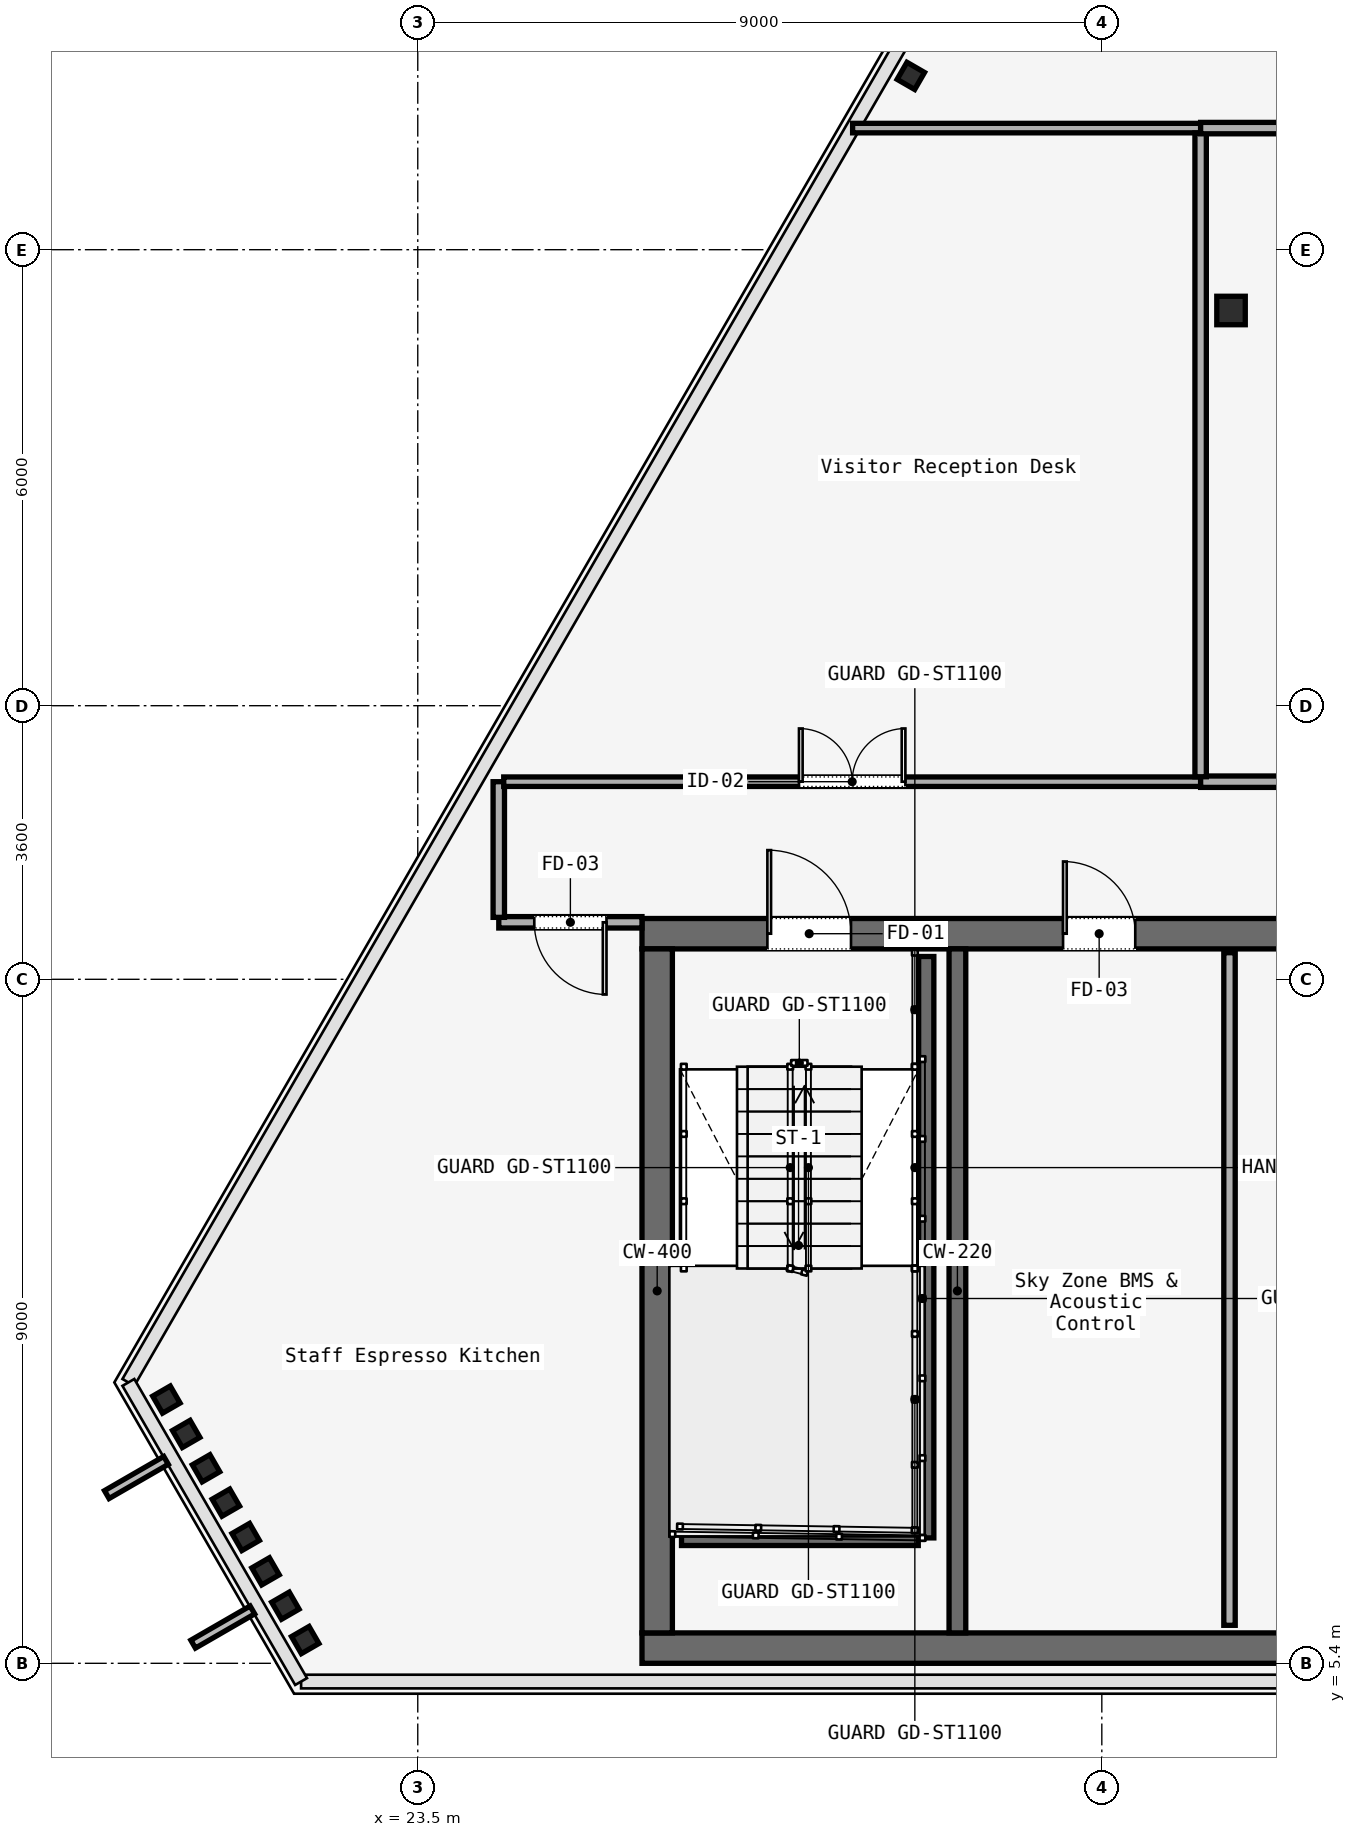
"""IFC4 building model, lengths in metres.
Left out: names, types, materials, properties, quantities, classifications, styles, units other than length and angle.
Written with IfcOpenShell. Run it as: python <this file> out.ifc"""

import sys

from ifc_helpers import new_model, si_unit, direction, frame, frame_2d, origin, origin_2d, place, context, subcontext, project, spatial, rectangle, i_section, extrude, element, fill, save


model = new_model("IFC4")
c1 = context("Model", 3, precision=1e-05, world=origin(), true_north=direction((0.0, 1.0)))
c2 = subcontext(c1, "Body", "Model", "MODEL_VIEW")
j1 = project(units=[si_unit("LENGTHUNIT", "METRE"), si_unit("PLANEANGLEUNIT", "RADIAN")], contexts=[c1])
p1 = place(None, origin())
s1 = spatial("IfcSite", under=j1, at=p1, CompositionType="ELEMENT")
p2 = place(p1, origin())
s2 = spatial("IfcBuilding", under=s1, at=p2, CompositionType="ELEMENT")
p3 = place(p2, frame((0.0, 0.0, 290.9)))
s3 = spatial("IfcBuildingStorey", under=s2, at=p3, CompositionType="ELEMENT", Elevation=290.9)
p4 = place(p3, frame((26.45, 15.0, 0.0), z_axis=(0.0, 0.0, 1.0), x_axis=(1.0, 0.0, 0.0)))
e1 = element("IfcWall", 1, at=p4, inside=s3, PredefinedType="SOLIDWALL", context=c2, shape_type="SweptSolid", body=[
    extrude(rectangle(XDim=31.1, YDim=0.4, at=frame_2d((15.55, 0.0))), origin(), (0.0, 0.0, 1.0), 3.58),
])
p5 = place(p4, frame((1.65, 0.0, 0.0)))
e2 = element("IfcOpeningElement", 2, at=p5, cuts=e1, PredefinedType="OPENING", context=c2, shape_type="SweptSolid", body=[
    extrude(rectangle(XDim=1.1, YDim=2.2, at=frame_2d((0.55, 1.1))), frame((0.0, 0.2, 0.0), z_axis=(0.0, -1.0, 0.0), x_axis=(1.0, 0.0, 0.0)), (0.0, 0.0, 1.0), 0.4),
])
p6 = place(p4, frame((13.65, 0.0, 0.0)))
e3 = element("IfcOpeningElement", 3, at=p6, cuts=e1, PredefinedType="OPENING", context=c2, shape_type="SweptSolid", body=[
    extrude(rectangle(XDim=1.1, YDim=2.2, at=frame_2d((0.55, 1.1))), frame((0.0, 0.2, 0.0), z_axis=(0.0, -1.0, 0.0), x_axis=(1.0, 0.0, 0.0)), (0.0, 0.0, 1.0), 0.4),
])
p7 = place(p4, frame((25.55, 0.0, 0.0)))
e4 = element("IfcOpeningElement", 4, at=p7, cuts=e1, PredefinedType="OPENING", context=c2, shape_type="SweptSolid", body=[
    extrude(rectangle(XDim=1.1, YDim=2.2, at=frame_2d((0.55, 1.1))), frame((0.0, 0.2, 0.0), z_axis=(0.0, -1.0, 0.0), x_axis=(1.0, 0.0, 0.0)), (0.0, 0.0, 1.0), 0.4),
])
p8 = place(p4, frame((19.35, 0.0, 0.0)))
e5 = element("IfcOpeningElement", 5, at=p8, cuts=e1, PredefinedType="OPENING", context=c2, shape_type="SweptSolid", body=[
    extrude(rectangle(XDim=1.1, YDim=2.2, at=frame_2d((0.55, 1.1))), frame((0.0, 0.2, 0.0), z_axis=(0.0, -1.0, 0.0), x_axis=(1.0, 0.0, 0.0)), (0.0, 0.0, 1.0), 0.4),
])
p9 = place(p4, frame((21.4, 0.0, 0.0)))
e6 = element("IfcOpeningElement", 6, at=p9, cuts=e1, PredefinedType="OPENING", context=c2, shape_type="SweptSolid", body=[
    extrude(rectangle(XDim=0.9, YDim=2.1, at=frame_2d((0.45, 1.05))), frame((0.0, 0.2, 0.0), z_axis=(0.0, -1.0, 0.0), x_axis=(1.0, 0.0, 0.0)), (0.0, 0.0, 1.0), 0.4),
])
p10 = place(p4, frame((5.54, 0.0, 0.0)))
e7 = element("IfcOpeningElement", 7, at=p10, cuts=e1, PredefinedType="OPENING", context=c2, shape_type="SweptSolid", body=[
    extrude(rectangle(XDim=0.95, YDim=2.2, at=frame_2d((0.475, 1.1))), frame((0.0, 0.2, 0.0), z_axis=(0.0, -1.0, 0.0), x_axis=(1.0, 0.0, 0.0)), (0.0, 0.0, 1.0), 0.4),
])
p11 = place(p4, frame((9.49, 0.0, 0.0)))
e8 = element("IfcOpeningElement", 8, at=p11, cuts=e1, PredefinedType="OPENING", context=c2, shape_type="SweptSolid", body=[
    extrude(rectangle(XDim=0.95, YDim=2.2, at=frame_2d((0.475, 1.1))), frame((0.0, 0.2, 0.0), z_axis=(0.0, -1.0, 0.0), x_axis=(1.0, 0.0, 0.0)), (0.0, 0.0, 1.0), 0.4),
])
p12 = place(p4, frame((23.35, 0.0, 0.0)))
e9 = element("IfcOpeningElement", 9, at=p12, cuts=e1, PredefinedType="OPENING", context=c2, shape_type="SweptSolid", body=[
    extrude(rectangle(XDim=1.3, YDim=2.3, at=frame_2d((0.65, 1.15))), frame((0.0, 0.2, 0.0), z_axis=(0.0, -1.0, 0.0), x_axis=(1.0, 0.0, 0.0)), (0.0, 0.0, 1.0), 0.4),
])
p13 = place(p3, frame((26.45, 5.6, 0.0), z_axis=(0.0, 0.0, 1.0), x_axis=(1.0, 0.0, 0.0)))
e10 = element("IfcWall", 10, at=p13, inside=s3, PredefinedType="SOLIDWALL", context=c2, shape_type="SweptSolid", body=[
    extrude(rectangle(XDim=31.1, YDim=0.4, at=frame_2d((15.55, 0.0))), origin(), (0.0, 0.0, 1.0), 3.58),
])
p14 = place(p3, frame((26.65, 5.8, 0.0), z_axis=(0.0, 0.0, 1.0), x_axis=(0.0, 1.0, 0.0)))
e11 = element("IfcWall", 11, at=p14, inside=s3, PredefinedType="SOLIDWALL", context=c2, shape_type="SweptSolid", body=[
    extrude(rectangle(XDim=9.0, YDim=0.4, at=frame_2d((4.5, 0.0))), origin(), (0.0, 0.0, 1.0), 3.58),
])
p15 = place(p3, frame((30.6, 5.8, 0.0), z_axis=(0.0, 0.0, 1.0), x_axis=(0.0, 1.0, 0.0)))
e12 = element("IfcWall", 12, at=p15, inside=s3, PredefinedType="SOLIDWALL", context=c2, shape_type="SweptSolid", body=[
    extrude(rectangle(XDim=9.0, YDim=0.22, at=frame_2d((4.5, 0.0))), origin(), (0.0, 0.0, 1.0), 3.58),
])
p16 = place(p3, frame((34.2, 23.2, 0.0), z_axis=(0.0, 0.0, 1.0), x_axis=(1.0, 0.0, 0.0)))
e13 = element("IfcColumn", 13, at=p16, inside=s3, PredefinedType="COLUMN", context=c2, shape_type="SweptSolid", body=[
    extrude(i_section(OverallWidth=0.375, OverallDepth=0.375, WebThickness=0.017, FlangeThickness=0.027, FilletRadius=0.015, at=origin_2d()), origin(), (0.0, 0.0, 1.0), 3.58),
])
p17 = place(p3, frame((29.987, 26.287, 0.0), z_axis=(0.064911794707, -0.112513777493, 0.991527664154), x_axis=(0.003987046067, 0.993644521472, 0.112492970506)))
e14 = element("IfcColumn", 14, at=p17, inside=s3, PredefinedType="COLUMN", context=c2, shape_type="SweptSolid", body=[
    extrude(i_section(OverallWidth=0.259, OverallDepth=0.267, WebThickness=0.013, FlangeThickness=0.021, FilletRadius=0.013, at=origin_2d()), origin(), (0.0, 0.0, 1.0), 3.611),
])
p18 = place(p3, frame((20.193, 8.87, 0.0), z_axis=(0.051724991926, -0.119406974825, 0.991497100134), x_axis=(-0.80011318397, 0.589167860222, 0.112694832712)))
e15 = element("IfcColumn", 15, at=p18, inside=s3, PredefinedType="COLUMN", context=c2, shape_type="SweptSolid", body=[
    extrude(i_section(OverallWidth=0.259, OverallDepth=0.267, WebThickness=0.013, FlangeThickness=0.021, FilletRadius=0.013, at=origin_2d()), origin(), (0.0, 0.0, 1.0), 3.611),
])
p19 = place(p3, frame((20.454, 8.418, 0.0), z_axis=(0.042555860906, -0.103746851986, 0.993692904979), x_axis=(-0.789181806641, 0.606433234677, 0.097112347031)))
e16 = element("IfcColumn", 16, at=p19, inside=s3, PredefinedType="COLUMN", context=c2, shape_type="SweptSolid", body=[
    extrude(i_section(OverallWidth=0.259, OverallDepth=0.267, WebThickness=0.013, FlangeThickness=0.021, FilletRadius=0.013, at=origin_2d()), origin(), (0.0, 0.0, 1.0), 3.603),
])
p20 = place(p3, frame((20.714, 7.966, 0.0), z_axis=(0.033470647913, -0.087919856081, 0.995565073029), x_axis=(-0.774036446069, 0.627877329686, 0.081471706891)))
e17 = element("IfcColumn", 17, at=p20, inside=s3, PredefinedType="COLUMN", context=c2, shape_type="SweptSolid", body=[
    extrude(i_section(OverallWidth=0.259, OverallDepth=0.267, WebThickness=0.013, FlangeThickness=0.021, FilletRadius=0.013, at=origin_2d()), origin(), (0.0, 0.0, 1.0), 3.596),
])
p21 = place(p3, frame((20.975, 7.514, 0.0), z_axis=(0.024274823165, -0.072076505755, 0.997103660749), x_axis=(-0.749462086186, 0.658762752498, 0.065865144737)))
e18 = element("IfcColumn", 18, at=p21, inside=s3, PredefinedType="COLUMN", context=c2, shape_type="SweptSolid", body=[
    extrude(i_section(OverallWidth=0.259, OverallDepth=0.267, WebThickness=0.013, FlangeThickness=0.021, FilletRadius=0.013, at=origin_2d()), origin(), (0.0, 0.0, 1.0), 3.591),
])
p22 = place(p3, frame((21.236, 7.062, 0.0), z_axis=(0.01504542395, -0.056165044156, 0.998308130305), x_axis=(-0.706681200924, 0.705737927659, 0.050355314766)))
e19 = element("IfcColumn", 19, at=p22, inside=s3, PredefinedType="COLUMN", context=c2, shape_type="SweptSolid", body=[
    extrude(i_section(OverallWidth=0.259, OverallDepth=0.267, WebThickness=0.013, FlangeThickness=0.021, FilletRadius=0.013, at=origin_2d()), origin(), (0.0, 0.0, 1.0), 3.586),
])
p23 = place(p3, frame((21.497, 6.61, 0.0), z_axis=(0.005791741097, -0.040133358895, 0.999177546404), x_axis=(-0.618468463563, 0.785024577009, 0.035116564052)))
e20 = element("IfcColumn", 20, at=p23, inside=s3, PredefinedType="COLUMN", context=c2, shape_type="SweptSolid", body=[
    extrude(i_section(OverallWidth=0.259, OverallDepth=0.267, WebThickness=0.013, FlangeThickness=0.021, FilletRadius=0.013, at=origin_2d()), origin(), (0.0, 0.0, 1.0), 3.583),
])
p24 = place(p3, frame((21.758, 6.158, 0.0), z_axis=(-0.003476876794, -0.024065441336, 0.999704339223), x_axis=(-0.371064507273, 0.928368302905, 0.021057673285)))
e21 = element("IfcColumn", 21, at=p24, inside=s3, PredefinedType="COLUMN", context=c2, shape_type="SweptSolid", body=[
    extrude(i_section(OverallWidth=0.259, OverallDepth=0.267, WebThickness=0.013, FlangeThickness=0.021, FilletRadius=0.013, at=origin_2d()), origin(), (0.0, 0.0, 1.0), 3.581),
])
p25 = place(p3, frame((22.019, 5.706, 0.0), z_axis=(-0.012750869074, -0.008046002945, 0.999886332127), x_axis=(0.46549137214, 0.884956095151, 0.013057263081)))
e22 = element("IfcColumn", 22, at=p25, inside=s3, PredefinedType="COLUMN", context=c2, shape_type="SweptSolid", body=[
    extrude(i_section(OverallWidth=0.259, OverallDepth=0.267, WebThickness=0.013, FlangeThickness=0.021, FilletRadius=0.013, at=origin_2d()), origin(), (0.0, 0.0, 1.0), 3.581),
])
p26 = place(p3, frame((30.19, 14.7, 0.0), z_axis=(0.0, 0.0, 1.0), x_axis=(0.0, -1.0, 0.0)))
e23 = element("IfcWall", 23, at=p26, inside=s3, PredefinedType="SOLIDWALL", context=c2, shape_type="SweptSolid", body=[
    extrude(rectangle(XDim=7.65, YDim=0.2, at=frame_2d((3.825, 0.0))), origin(), (0.0, 0.0, 1.0), 3.8),
])
p27 = place(p3, frame((26.97, 7.05, 0.0), z_axis=(0.0, 0.0, 1.0), x_axis=(1.0, 0.0, 0.0)))
e24 = element("IfcWall", 24, at=p27, inside=s3, PredefinedType="SOLIDWALL", context=c2, shape_type="SweptSolid", body=[
    extrude(rectangle(XDim=3.115, YDim=0.2, at=frame_2d((1.558, 0.0))), origin(), (0.0, 0.0, 1.0), 3.8),
])
p28 = place(p3, frame((34.18, 5.9, 0.0), z_axis=(0.0, 0.0, 1.0), x_axis=(0.0, 1.0, 0.0)))
e25 = element("IfcWall", 25, at=p28, inside=s3, PredefinedType="PARTITIONING", context=c2, shape_type="SweptSolid", body=[
    extrude(rectangle(XDim=8.85, YDim=0.15, at=frame_2d((4.425, 0.0))), origin(), (0.0, 0.0, 1.0), 3.01),
])
p29 = place(p3, frame((26.45, 15.15, 0.0), z_axis=(0.0, 0.0, 1.0), x_axis=(-1.0, 0.0, 0.0)))
e26 = element("IfcWall", 26, at=p29, inside=s3, PredefinedType="PARTITIONING", context=c2, shape_type="SweptSolid", body=[
    extrude(rectangle(XDim=1.884, YDim=0.15, at=frame_2d((0.942, 0.0))), origin(), (0.0, 0.0, 1.0), 3.01),
])
p30 = place(p29, frame((0.467, 0.0, 0.0)))
e27 = element("IfcOpeningElement", 27, at=p30, cuts=e26, PredefinedType="OPENING", context=c2, shape_type="SweptSolid", body=[
    extrude(rectangle(XDim=0.95, YDim=2.2, at=frame_2d((0.475, 1.1))), frame((0.0, 0.075, 0.0), z_axis=(0.0, -1.0, 0.0), x_axis=(1.0, 0.0, 0.0)), (0.0, 0.0, 1.0), 0.15),
])
p31 = place(p3, frame((24.566, 15.215, 0.0), z_axis=(0.0, 0.0, 1.0), x_axis=(0.0, 1.0, 0.0)))
e28 = element("IfcWall", 28, at=p31, inside=s3, PredefinedType="PARTITIONING", context=c2, shape_type="SweptSolid", body=[
    extrude(rectangle(XDim=1.785, YDim=0.15, at=frame_2d((0.893, 0.0))), origin(), (0.0, 0.0, 1.0), 3.01),
])
p32 = place(p3, frame((24.631, 17.0, 0.0), z_axis=(0.0, 0.0, 1.0), x_axis=(1.0, 0.0, 0.0)))
e29 = element("IfcWall", 29, at=p32, inside=s3, PredefinedType="PARTITIONING", context=c2, shape_type="SweptSolid", body=[
    extrude(rectangle(XDim=9.169, YDim=0.125, at=frame_2d((4.584, 0.0))), origin(), (0.0, 0.0, 1.0), 3.01),
])
p33 = place(p32, frame((3.885, 0.0, 0.0)))
e30 = element("IfcOpeningElement", 30, at=p33, cuts=e29, PredefinedType="OPENING", context=c2, shape_type="SweptSolid", body=[
    extrude(rectangle(XDim=1.4, YDim=2.2, at=frame_2d((0.7, 1.1))), frame((0.0, 0.062, 0.0), z_axis=(0.0, -1.0, 0.0), x_axis=(1.0, 0.0, 0.0)), (0.0, 0.0, 1.0), 0.125),
])
p34 = place(p3, frame((33.8, 17.0, 0.0), z_axis=(0.0, 0.0, 1.0), x_axis=(1.0, 0.0, 0.0)))
e31 = element("IfcWall", 31, at=p34, inside=s3, PredefinedType="PARTITIONING", context=c2, shape_type="SweptSolid", body=[
    extrude(rectangle(XDim=4.8, YDim=0.15, at=frame_2d((2.4, 0.0))), origin(), (0.0, 0.0, 1.0), 3.01),
])
p35 = place(p34, frame((1.925, 0.0, 0.0)))
e32 = element("IfcOpeningElement", 32, at=p35, cuts=e31, PredefinedType="OPENING", context=c2, shape_type="SweptSolid", body=[
    extrude(rectangle(XDim=0.95, YDim=2.2, at=frame_2d((0.475, 1.1))), frame((0.0, 0.075, 0.0), z_axis=(0.0, -1.0, 0.0), x_axis=(1.0, 0.0, 0.0)), (0.0, 0.0, 1.0), 0.15),
])
p36 = place(p3, frame((29.221, 25.6, 0.0), z_axis=(0.0, 0.0, 1.0), x_axis=(1.0, 0.0, 0.0)))
e33 = element("IfcWall", 33, at=p36, inside=s3, PredefinedType="PARTITIONING", context=c2, shape_type="SweptSolid", body=[
    extrude(rectangle(XDim=4.579, YDim=0.125, at=frame_2d((2.29, 0.0))), origin(), (0.0, 0.0, 1.0), 3.01),
])
p37 = place(p3, frame((33.8, 25.535, 0.0), z_axis=(0.0, 0.0, 1.0), x_axis=(0.0, -1.0, 0.0)))
e34 = element("IfcWall", 34, at=p37, inside=s3, PredefinedType="PARTITIONING", context=c2, shape_type="SweptSolid", body=[
    extrude(rectangle(XDim=8.47, YDim=0.15, at=frame_2d((4.235, 0.0))), origin(), (0.0, 0.0, 1.0), 3.01),
])
p38 = place(p3, frame((33.8, 25.6, 0.0), z_axis=(0.0, 0.0, 1.0), x_axis=(1.0, 0.0, 0.0)))
e35 = element("IfcWall", 35, at=p38, inside=s3, PredefinedType="PARTITIONING", context=c2, shape_type="SweptSolid", body=[
    extrude(rectangle(XDim=2.935, YDim=0.15, at=frame_2d((1.468, 0.0))), origin(), (0.0, 0.0, 1.0), 3.01),
])
p39 = place(p5, origin())
e36 = element("IfcDoor", 36, at=p39, inside=s3, OperationType="SINGLE_SWING_RIGHT", PredefinedType="DOOR", context=c2, shape_type="SweptSolid", body=[
    extrude(rectangle(XDim=1.1, YDim=2.2, at=frame_2d((0.55, 1.1))), frame((0.0, 0.025, 0.0), z_axis=(0.0, -1.0, 0.0), x_axis=(1.0, 0.0, 0.0)), (0.0, 0.0, 1.0), 0.05),
])
fill(e2, e36)
p40 = place(p10, origin())
e37 = element("IfcDoor", 37, at=p40, inside=s3, OperationType="SINGLE_SWING_LEFT", PredefinedType="DOOR", context=c2, shape_type="SweptSolid", body=[
    extrude(rectangle(XDim=0.95, YDim=2.2, at=frame_2d((0.475, 1.1))), frame((0.0, 0.025, 0.0), z_axis=(0.0, -1.0, 0.0), x_axis=(1.0, 0.0, 0.0)), (0.0, 0.0, 1.0), 0.05),
])
fill(e7, e37)
p41 = place(p30, origin())
e38 = element("IfcDoor", 38, at=p41, inside=s3, OperationType="SINGLE_SWING_RIGHT", PredefinedType="DOOR", context=c2, shape_type="SweptSolid", body=[
    extrude(rectangle(XDim=0.95, YDim=2.2, at=frame_2d((0.475, 1.1))), frame((0.0, 0.025, 0.0), z_axis=(0.0, -1.0, 0.0), x_axis=(1.0, 0.0, 0.0)), (0.0, 0.0, 1.0), 0.05),
])
fill(e27, e38)
p42 = place(p33, origin())
e39 = element("IfcDoor", 39, at=p42, inside=s3, OperationType="SINGLE_SWING_RIGHT", PredefinedType="DOOR", context=c2, shape_type="SweptSolid", body=[
    extrude(rectangle(XDim=1.4, YDim=2.2, at=frame_2d((0.7, 1.1))), frame((0.0, 0.025, 0.0), z_axis=(0.0, -1.0, 0.0), x_axis=(1.0, 0.0, 0.0)), (0.0, 0.0, 1.0), 0.05),
])
fill(e30, e39)
save(model, sys.argv[1])
